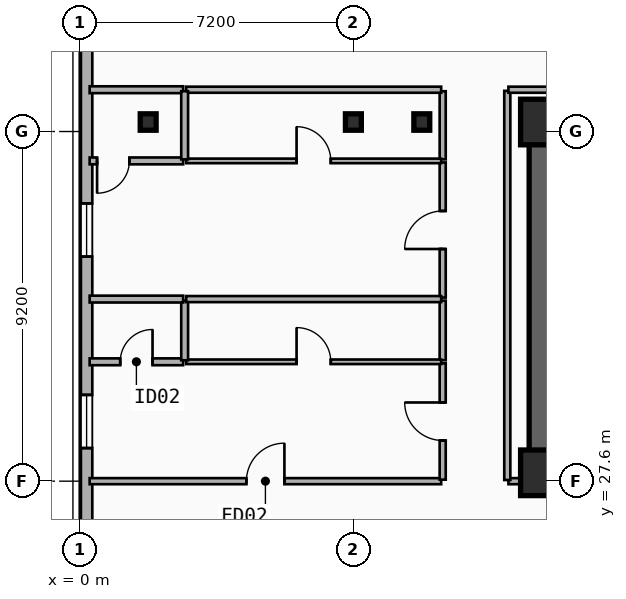
"""IFC4 building model, lengths in metres.
Left out: names, types, materials, properties, quantities, classifications, styles, units other than length and angle.
Written with IfcOpenShell. Run it as: python <this file> out.ifc"""

import sys

from ifc_helpers import new_model, si_unit, direction, frame, frame_2d, origin, origin_2d, place, context, subcontext, project, spatial, rectangle, i_section, extrude, element, fill, save


model = new_model("IFC4")
c1 = context("Model", 3, precision=1e-05, world=origin(), true_north=direction((0.0, 1.0)))
c2 = subcontext(c1, "Body", "Model", "MODEL_VIEW")
j1 = project(units=[si_unit("LENGTHUNIT", "METRE"), si_unit("PLANEANGLEUNIT", "RADIAN")], contexts=[c1])
p1 = place(None, origin())
s1 = spatial("IfcSite", under=j1, at=p1, CompositionType="ELEMENT")
p2 = place(p1, origin())
s2 = spatial("IfcBuilding", under=s1, at=p2, CompositionType="ELEMENT")
p3 = place(p2, frame((0.0, 0.0, 115.3)))
s3 = spatial("IfcBuildingStorey", under=s2, at=p3, CompositionType="ELEMENT", Elevation=115.3)
p4 = place(p3, frame((12.15, 37.05, 0.0), z_axis=(0.0, 0.0, 1.0), x_axis=(1.0, 0.0, 0.0)))
e1 = element("IfcWall", 1, at=p4, inside=s3, PredefinedType="SHEAR", context=c2, shape_type="SweptSolid", body=[
    extrude(rectangle(XDim=33.23, YDim=0.65, at=frame_2d((16.615, 0.0))), origin(), (0.0, 0.0, 1.0), 3.5),
])
p5 = place(p3, frame((21.18, 27.82, 0.0), z_axis=(0.0, 0.0, 1.0), x_axis=(-1.0, 0.0, 0.0)))
e2 = element("IfcWall", 2, at=p5, inside=s3, PredefinedType="SHEAR", context=c2, shape_type="SweptSolid", body=[
    extrude(rectangle(XDim=9.03, YDim=0.65, at=frame_2d((4.515, 0.0))), origin(), (0.0, 0.0, 1.0), 3.5),
])
p6 = place(p5, frame((2.68, 0.0, 0.0)))
e3 = element("IfcOpeningElement", 3, at=p6, cuts=e2, PredefinedType="OPENING", context=c2, shape_type="SweptSolid", body=[
    extrude(rectangle(XDim=1.1, YDim=2.15, at=frame_2d((0.55, 1.075))), frame((0.0, 0.335, 0.0), z_axis=(0.0, -1.0, 0.0), x_axis=(1.0, 0.0, 0.0)), (0.0, 0.0, 1.0), 0.67),
])
p7 = place(p3, frame((12.15, 28.145, 0.0), z_axis=(0.0, 0.0, 1.0), x_axis=(0.0, 1.0, 0.0)))
e4 = element("IfcWall", 4, at=p7, inside=s3, PredefinedType="SHEAR", context=c2, shape_type="SweptSolid", body=[
    extrude(rectangle(XDim=8.58, YDim=0.65, at=frame_2d((4.29, 0.0))), origin(), (0.0, 0.0, 1.0), 3.5),
])
for number, where, z_axis, x_axis in (
    (5, (12.2, 27.82, 0.0), (0.0, 0.0, 1.0), (1.0, 0.0, 0.0)),
    (6, (12.2, 37.05, 0.0), (0.0, 0.0, 1.0), (1.0, 0.0, 0.0)),
):
    element("IfcColumn", number, at=place(p3, frame(where, z_axis=z_axis, x_axis=x_axis)), inside=s3, PredefinedType="COLUMN", context=c2, shape_type="SweptSolid", body=[
        extrude(rectangle(XDim=1.2, YDim=1.2, at=origin_2d()), origin(), (0.0, 0.0, 1.0), 3.5),
    ])
for number, where, z_axis, x_axis in (
    (7, (9.0, 37.05, 0.0), (0.0, 0.0, 1.0), (1.0, 0.0, 0.0)),
    (8, (1.8, 37.05, 0.0), (0.0, 0.0, 1.0), (1.0, 0.0, 0.0)),
    (9, (7.2, 37.05, 0.0), (0.0, 0.0, 1.0), (1.0, 0.0, 0.0)),
):
    element("IfcColumn", number, at=place(p3, frame(where, z_axis=z_axis, x_axis=x_axis)), inside=s3, PredefinedType="COLUMN", context=c2, shape_type="SweptSolid", body=[
        extrude(i_section(OverallWidth=0.418, OverallDepth=0.432, WebThickness=0.035, FlangeThickness=0.056, FilletRadius=0.015, at=origin_2d()), origin(), (0.0, 0.0, 1.0), 3.5),
    ])
p8 = place(p3, frame((0.18, 21.0, 0.0), z_axis=(0.0, 0.0, 1.0), x_axis=(0.0, 1.0, 0.0)))
e10 = element("IfcWall", 10, at=p8, inside=s3, PredefinedType="SOLIDWALL", context=c2, shape_type="SweptSolid", body=[
    extrude(rectangle(XDim=18.0, YDim=0.3, at=frame_2d((9.0, 0.0))), origin(), (0.0, 0.0, 1.0), 3.24),
])
p9 = place(p8, frame((7.47, 0.0, 0.48)))
e11 = element("IfcOpeningElement", 11, at=p9, cuts=e10, PredefinedType="OPENING", context=c2, shape_type="SweptSolid", body=[
    extrude(rectangle(XDim=1.4, YDim=1.8, at=frame_2d((0.7, 0.9))), frame((0.0, 0.16, 0.0), z_axis=(0.0, -1.0, 0.0), x_axis=(1.0, 0.0, 0.0)), (0.0, 0.0, 1.0), 0.32),
])
p10 = place(p8, frame((12.509, 0.0, 0.48)))
e12 = element("IfcOpeningElement", 12, at=p10, cuts=e10, PredefinedType="OPENING", context=c2, shape_type="SweptSolid", body=[
    extrude(rectangle(XDim=1.4, YDim=1.8, at=frame_2d((0.7, 0.9))), frame((0.0, 0.16, 0.0), z_axis=(0.0, -1.0, 0.0), x_axis=(1.0, 0.0, 0.0)), (0.0, 0.0, 1.0), 0.32),
])
p11 = place(p8, frame((0.32, 0.0, 0.65)))
e13 = element("IfcOpeningElement", 13, at=p11, cuts=e10, PredefinedType="OPENING", context=c2, shape_type="SweptSolid", body=[
    extrude(rectangle(XDim=1.4, YDim=1.8, at=frame_2d((0.7, 0.9))), frame((0.0, 0.16, 0.0), z_axis=(0.0, -1.0, 0.0), x_axis=(1.0, 0.0, 0.0)), (0.0, 0.0, 1.0), 0.32),
])
p12 = place(p3, frame((0.26, 27.6, 0.0), z_axis=(0.0, 0.0, 1.0), x_axis=(1.0, 0.0, 0.0)))
e14 = element("IfcWall", 14, at=p12, inside=s3, PredefinedType="PARTITIONING", context=c2, shape_type="SweptSolid", body=[
    extrude(rectangle(XDim=9.25, YDim=0.16, at=frame_2d((4.625, 0.0))), origin(), (0.0, 0.0, 1.0), 2.57),
])
p13 = place(p12, frame((4.125, 0.0, 0.0)))
e15 = element("IfcOpeningElement", 15, at=p13, cuts=e14, PredefinedType="OPENING", context=c2, shape_type="SweptSolid", body=[
    extrude(rectangle(XDim=1.0, YDim=2.15, at=frame_2d((0.5, 1.075))), frame((0.0, 0.09, 0.0), z_axis=(0.0, -1.0, 0.0), x_axis=(1.0, 0.0, 0.0)), (0.0, 0.0, 1.0), 0.18),
])
p14 = place(p3, frame((9.55, 27.64, 0.0), z_axis=(0.0, 0.0, 1.0), x_axis=(0.0, 1.0, 0.0)))
e16 = element("IfcWall", 16, at=p14, inside=s3, PredefinedType="PARTITIONING", context=c2, shape_type="SweptSolid", body=[
    extrude(rectangle(XDim=3.061, YDim=0.16, at=frame_2d((1.531, 0.0))), origin(), (0.0, 0.0, 1.0), 3.24),
])
p15 = place(p14, frame((1.031, 0.0, 0.0)))
e17 = element("IfcOpeningElement", 17, at=p15, cuts=e16, PredefinedType="OPENING", context=c2, shape_type="SweptSolid", body=[
    extrude(rectangle(XDim=1.0, YDim=2.15, at=frame_2d((0.5, 1.075))), frame((0.0, 0.09, 0.0), z_axis=(0.0, -1.0, 0.0), x_axis=(1.0, 0.0, 0.0)), (0.0, 0.0, 1.0), 0.18),
])
p16 = place(p3, frame((9.55, 30.781, 0.0), z_axis=(0.0, 0.0, 1.0), x_axis=(0.0, 1.0, 0.0)))
e18 = element("IfcWall", 18, at=p16, inside=s3, PredefinedType="PARTITIONING", context=c2, shape_type="SweptSolid", body=[
    extrude(rectangle(XDim=1.57, YDim=0.16, at=frame_2d((0.785, 0.0))), origin(), (0.0, 0.0, 1.0), 3.24),
])
p17 = place(p3, frame((9.55, 32.431, 0.0), z_axis=(0.0, 0.0, 1.0), x_axis=(0.0, 1.0, 0.0)))
e19 = element("IfcWall", 19, at=p17, inside=s3, PredefinedType="PARTITIONING", context=c2, shape_type="SweptSolid", body=[
    extrude(rectangle(XDim=3.556, YDim=0.16, at=frame_2d((1.778, 0.0))), origin(), (0.0, 0.0, 1.0), 3.24),
])
p18 = place(p17, frame((1.278, 0.0, 0.0)))
e20 = element("IfcOpeningElement", 20, at=p18, cuts=e19, PredefinedType="OPENING", context=c2, shape_type="SweptSolid", body=[
    extrude(rectangle(XDim=1.0, YDim=2.15, at=frame_2d((0.5, 1.075))), frame((0.0, 0.09, 0.0), z_axis=(0.0, -1.0, 0.0), x_axis=(1.0, 0.0, 0.0)), (0.0, 0.0, 1.0), 0.18),
])
p19 = place(p3, frame((9.55, 36.067, 0.0), z_axis=(0.0, 0.0, 1.0), x_axis=(0.0, 1.0, 0.0)))
e21 = element("IfcWall", 21, at=p19, inside=s3, PredefinedType="PARTITIONING", context=c2, shape_type="SweptSolid", body=[
    extrude(rectangle(XDim=1.793, YDim=0.16, at=frame_2d((0.896, 0.0))), origin(), (0.0, 0.0, 1.0), 2.72),
])
p20 = place(p3, frame((0.26, 37.9, 0.0), z_axis=(0.0, 0.0, 1.0), x_axis=(1.0, 0.0, 0.0)))
e22 = element("IfcWall", 22, at=p20, inside=s3, PredefinedType="PLUMBINGWALL", context=c2, shape_type="SweptSolid", body=[
    extrude(rectangle(XDim=2.46, YDim=0.18, at=frame_2d((1.23, 0.0))), origin(), (0.0, 0.0, 1.0), 3.24),
])
p21 = place(p3, frame((2.8, 37.9, 0.0), z_axis=(0.0, 0.0, 1.0), x_axis=(1.0, 0.0, 0.0)))
e23 = element("IfcWall", 23, at=p21, inside=s3, PredefinedType="PARTITIONING", context=c2, shape_type="SweptSolid", body=[
    extrude(rectangle(XDim=6.71, YDim=0.16, at=frame_2d((3.355, 0.0))), origin(), (0.0, 0.0, 1.0), 3.24),
])
p22 = place(p3, frame((0.26, 30.741, 0.0), z_axis=(0.0, 0.0, 1.0), x_axis=(1.0, 0.0, 0.0)))
e24 = element("IfcWall", 24, at=p22, inside=s3, PredefinedType="PLUMBINGWALL", context=c2, shape_type="SweptSolid", body=[
    extrude(rectangle(XDim=2.46, YDim=0.18, at=frame_2d((1.23, 0.0))), origin(), (0.0, 0.0, 1.0), 2.57),
])
p23 = place(p22, frame((0.805, 0.0, 0.0)))
e25 = element("IfcOpeningElement", 25, at=p23, cuts=e24, PredefinedType="OPENING", context=c2, shape_type="SweptSolid", body=[
    extrude(rectangle(XDim=0.85, YDim=2.1, at=frame_2d((0.425, 1.05))), frame((0.0, 0.1, 0.0), z_axis=(0.0, -1.0, 0.0), x_axis=(1.0, 0.0, 0.0)), (0.0, 0.0, 1.0), 0.2),
])
p24 = place(p3, frame((2.8, 30.741, 0.0), z_axis=(0.0, 0.0, 1.0), x_axis=(1.0, 0.0, 0.0)))
e26 = element("IfcWall", 26, at=p24, inside=s3, PredefinedType="PARTITIONING", context=c2, shape_type="SweptSolid", body=[
    extrude(rectangle(XDim=6.71, YDim=0.12, at=frame_2d((3.355, 0.0))), origin(), (0.0, 0.0, 1.0), 2.57),
])
p25 = place(p24, frame((2.905, 0.0, 0.0)))
e27 = element("IfcOpeningElement", 27, at=p25, cuts=e26, PredefinedType="OPENING", context=c2, shape_type="SweptSolid", body=[
    extrude(rectangle(XDim=0.9, YDim=2.1, at=frame_2d((0.45, 1.05))), frame((0.0, 0.07, 0.0), z_axis=(0.0, -1.0, 0.0), x_axis=(1.0, 0.0, 0.0)), (0.0, 0.0, 1.0), 0.14),
])
p26 = place(p3, frame((2.76, 30.781, 0.0), z_axis=(0.0, 0.0, 1.0), x_axis=(0.0, 1.0, 0.0)))
e28 = element("IfcWall", 28, at=p26, inside=s3, PredefinedType="PLUMBINGWALL", context=c2, shape_type="SweptSolid", body=[
    extrude(rectangle(XDim=1.57, YDim=0.18, at=frame_2d((0.785, 0.0))), origin(), (0.0, 0.0, 1.0), 3.24),
])
p27 = place(p3, frame((0.26, 32.391, 0.0), z_axis=(0.0, 0.0, 1.0), x_axis=(1.0, 0.0, 0.0)))
e29 = element("IfcWall", 29, at=p27, inside=s3, PredefinedType="PLUMBINGWALL", context=c2, shape_type="SweptSolid", body=[
    extrude(rectangle(XDim=2.46, YDim=0.18, at=frame_2d((1.23, 0.0))), origin(), (0.0, 0.0, 1.0), 2.57),
])
p28 = place(p3, frame((2.8, 32.391, 0.0), z_axis=(0.0, 0.0, 1.0), x_axis=(1.0, 0.0, 0.0)))
e30 = element("IfcWall", 30, at=p28, inside=s3, PredefinedType="PARTITIONING", context=c2, shape_type="SweptSolid", body=[
    extrude(rectangle(XDim=6.71, YDim=0.16, at=frame_2d((3.355, 0.0))), origin(), (0.0, 0.0, 1.0), 2.57),
])
p29 = place(p3, frame((2.72, 36.027, 0.0), z_axis=(0.0, 0.0, 1.0), x_axis=(-1.0, 0.0, 0.0)))
e31 = element("IfcWall", 31, at=p29, inside=s3, PredefinedType="PLUMBINGWALL", context=c2, shape_type="SweptSolid", body=[
    extrude(rectangle(XDim=2.46, YDim=0.18, at=frame_2d((1.23, 0.0))), origin(), (0.0, 0.0, 1.0), 2.57),
])
p30 = place(p29, frame((1.415, 0.0, 0.0)))
e32 = element("IfcOpeningElement", 32, at=p30, cuts=e31, PredefinedType="OPENING", context=c2, shape_type="SweptSolid", body=[
    extrude(rectangle(XDim=0.85, YDim=2.1, at=frame_2d((0.425, 1.05))), frame((0.0, 0.1, 0.0), z_axis=(0.0, -1.0, 0.0), x_axis=(1.0, 0.0, 0.0)), (0.0, 0.0, 1.0), 0.2),
])
p31 = place(p3, frame((2.8, 36.027, 0.0), z_axis=(0.0, 0.0, 1.0), x_axis=(1.0, 0.0, 0.0)))
e33 = element("IfcWall", 33, at=p31, inside=s3, PredefinedType="PARTITIONING", context=c2, shape_type="SweptSolid", body=[
    extrude(rectangle(XDim=6.71, YDim=0.12, at=frame_2d((3.355, 0.0))), origin(), (0.0, 0.0, 1.0), 2.57),
])
p32 = place(p31, frame((2.905, 0.0, 0.0)))
e34 = element("IfcOpeningElement", 34, at=p32, cuts=e33, PredefinedType="OPENING", context=c2, shape_type="SweptSolid", body=[
    extrude(rectangle(XDim=0.9, YDim=2.1, at=frame_2d((0.45, 1.05))), frame((0.0, 0.07, 0.0), z_axis=(0.0, -1.0, 0.0), x_axis=(1.0, 0.0, 0.0)), (0.0, 0.0, 1.0), 0.14),
])
p33 = place(p3, frame((2.76, 36.067, 0.0), z_axis=(0.0, 0.0, 1.0), x_axis=(0.0, 1.0, 0.0)))
e35 = element("IfcWall", 35, at=p33, inside=s3, PredefinedType="PLUMBINGWALL", context=c2, shape_type="SweptSolid", body=[
    extrude(rectangle(XDim=1.793, YDim=0.18, at=frame_2d((0.896, 0.0))), origin(), (0.0, 0.0, 1.0), 2.72),
])
p34 = place(p3, frame((11.28, 27.6, 0.0), z_axis=(0.0, 0.0, 1.0), x_axis=(1.0, 0.0, 0.0)))
e36 = element("IfcWall", 36, at=p34, inside=s3, PredefinedType="PARTITIONING", context=c2, shape_type="SweptSolid", body=[
    extrude(rectangle(XDim=0.84, YDim=0.16, at=frame_2d((0.42, 0.0))), origin(), (0.0, 0.0, 1.0), 2.28),
])
p35 = place(p3, frame((11.25, 27.63, 0.0), z_axis=(0.0, 0.0, 1.0), x_axis=(0.0, 1.0, 0.0)))
e37 = element("IfcWall", 37, at=p35, inside=s3, PredefinedType="PARTITIONING", context=c2, shape_type="SweptSolid", body=[
    extrude(rectangle(XDim=10.24, YDim=0.16, at=frame_2d((5.12, 0.0))), origin(), (0.0, 0.0, 1.0), 2.72),
])
p36 = place(p3, frame((11.28, 37.9, 0.0), z_axis=(0.0, 0.0, 1.0), x_axis=(1.0, 0.0, 0.0)))
e38 = element("IfcWall", 38, at=p36, inside=s3, PredefinedType="PARTITIONING", context=c2, shape_type="SweptSolid", body=[
    extrude(rectangle(XDim=35.04, YDim=0.16, at=frame_2d((17.52, 0.0))), origin(), (0.0, 0.0, 1.0), 3.24),
])
p37 = place(p9, origin())
e39 = element("IfcWindow", 39, at=p37, inside=s3, PartitioningType="SINGLE_PANEL", PredefinedType="WINDOW", context=c2, shape_type="SweptSolid", body=[
    extrude(rectangle(XDim=1.4, YDim=1.8, at=frame_2d((0.7, 0.9))), frame((0.0, 0.03, 0.0), z_axis=(0.0, -1.0, 0.0), x_axis=(1.0, 0.0, 0.0)), (0.0, 0.0, 1.0), 0.06),
])
fill(e11, e39)
p38 = place(p10, origin())
e40 = element("IfcWindow", 40, at=p38, inside=s3, PartitioningType="SINGLE_PANEL", PredefinedType="WINDOW", context=c2, shape_type="SweptSolid", body=[
    extrude(rectangle(XDim=1.4, YDim=1.8, at=frame_2d((0.7, 0.9))), frame((0.0, 0.03, 0.0), z_axis=(0.0, -1.0, 0.0), x_axis=(1.0, 0.0, 0.0)), (0.0, 0.0, 1.0), 0.06),
])
fill(e12, e40)
p39 = place(p13, origin())
e41 = element("IfcDoor", 41, at=p39, inside=s3, OperationType="SINGLE_SWING_RIGHT", PredefinedType="DOOR", context=c2, shape_type="SweptSolid", body=[
    extrude(rectangle(XDim=1.0, YDim=2.15, at=frame_2d((0.5, 1.075))), frame((0.0, 0.025, 0.0), z_axis=(0.0, -1.0, 0.0), x_axis=(1.0, 0.0, 0.0)), (0.0, 0.0, 1.0), 0.05),
])
fill(e15, e41)
p40 = place(p15, origin())
e42 = element("IfcDoor", 42, at=p40, inside=s3, OperationType="SINGLE_SWING_RIGHT", PredefinedType="DOOR", context=c2, shape_type="SweptSolid", body=[
    extrude(rectangle(XDim=1.0, YDim=2.15, at=frame_2d((0.5, 1.075))), frame((0.0, 0.025, 0.0), z_axis=(0.0, -1.0, 0.0), x_axis=(1.0, 0.0, 0.0)), (0.0, 0.0, 1.0), 0.05),
])
fill(e17, e42)
p41 = place(p18, origin())
e43 = element("IfcDoor", 43, at=p41, inside=s3, OperationType="SINGLE_SWING_LEFT", PredefinedType="DOOR", context=c2, shape_type="SweptSolid", body=[
    extrude(rectangle(XDim=1.0, YDim=2.15, at=frame_2d((0.5, 1.075))), frame((0.0, 0.025, 0.0), z_axis=(0.0, -1.0, 0.0), x_axis=(1.0, 0.0, 0.0)), (0.0, 0.0, 1.0), 0.05),
])
fill(e20, e43)
p42 = place(p23, origin())
e44 = element("IfcDoor", 44, at=p42, inside=s3, OperationType="SINGLE_SWING_RIGHT", PredefinedType="DOOR", context=c2, shape_type="SweptSolid", body=[
    extrude(rectangle(XDim=0.85, YDim=2.1, at=frame_2d((0.425, 1.05))), frame((0.0, 0.025, 0.0), z_axis=(0.0, -1.0, 0.0), x_axis=(1.0, 0.0, 0.0)), (0.0, 0.0, 1.0), 0.05),
])
fill(e25, e44)
p43 = place(p25, origin())
e45 = element("IfcDoor", 45, at=p43, inside=s3, OperationType="SINGLE_SWING_LEFT", PredefinedType="DOOR", context=c2, shape_type="SweptSolid", body=[
    extrude(rectangle(XDim=0.9, YDim=2.1, at=frame_2d((0.45, 1.05))), frame((0.0, 0.025, 0.0), z_axis=(0.0, -1.0, 0.0), x_axis=(1.0, 0.0, 0.0)), (0.0, 0.0, 1.0), 0.05),
])
fill(e27, e45)
p44 = place(p30, origin())
e46 = element("IfcDoor", 46, at=p44, inside=s3, OperationType="SINGLE_SWING_RIGHT", PredefinedType="DOOR", context=c2, shape_type="SweptSolid", body=[
    extrude(rectangle(XDim=0.85, YDim=2.1, at=frame_2d((0.425, 1.05))), frame((0.0, 0.025, 0.0), z_axis=(0.0, -1.0, 0.0), x_axis=(1.0, 0.0, 0.0)), (0.0, 0.0, 1.0), 0.05),
])
fill(e32, e46)
p45 = place(p32, origin())
e47 = element("IfcDoor", 47, at=p45, inside=s3, OperationType="SINGLE_SWING_LEFT", PredefinedType="DOOR", context=c2, shape_type="SweptSolid", body=[
    extrude(rectangle(XDim=0.9, YDim=2.1, at=frame_2d((0.45, 1.05))), frame((0.0, 0.025, 0.0), z_axis=(0.0, -1.0, 0.0), x_axis=(1.0, 0.0, 0.0)), (0.0, 0.0, 1.0), 0.05),
])
fill(e34, e47)
save(model, sys.argv[1])
